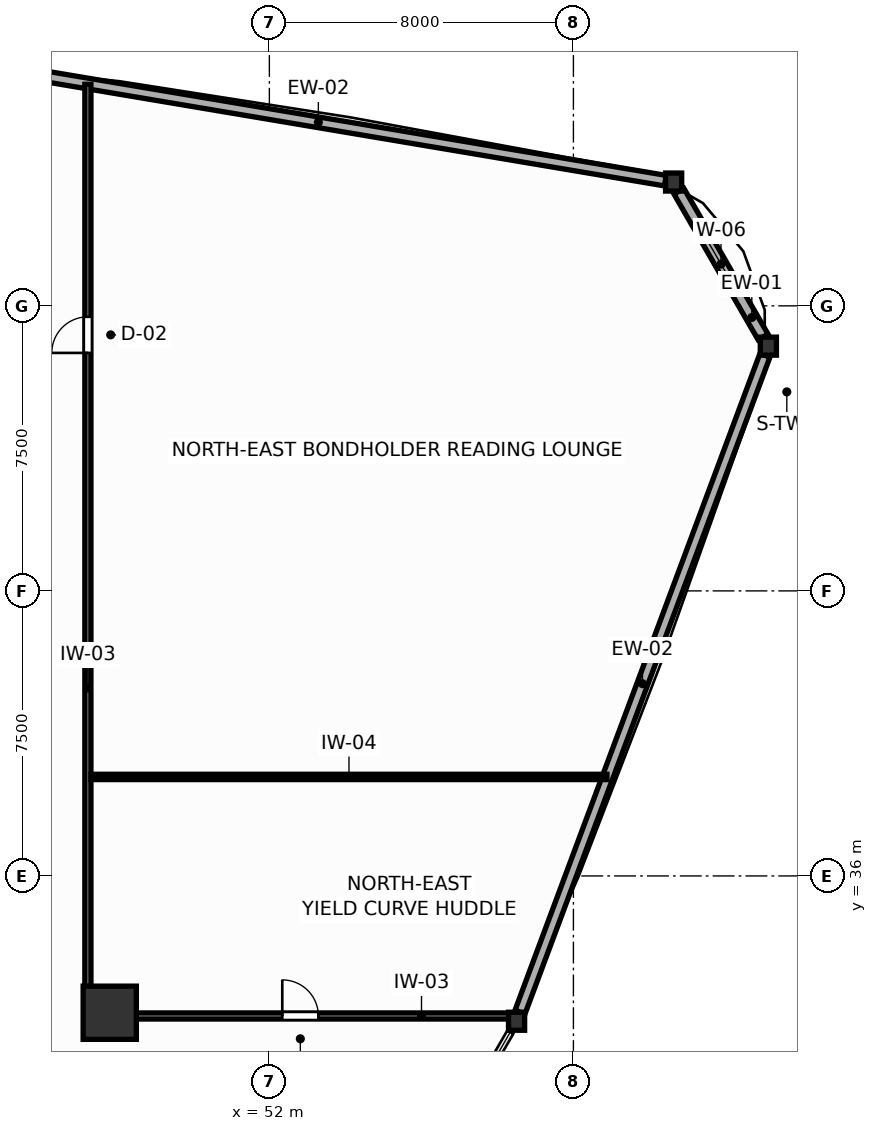
"""IFC4 building model, lengths in metres.
Left out: names, types, materials, properties, quantities, classifications, styles, units other than length and angle.
Written with IfcOpenShell. Run it as: python <this file> out.ifc"""

import sys

from ifc_helpers import new_model, si_unit, direction, frame, frame_2d, origin, origin_2d, place, context, subcontext, project, spatial, rectangle, i_section, extrude, source, transform, mapped, element, fill, save


model = new_model("IFC4")
c1 = context("Model", 3, precision=1e-05, world=origin(), true_north=direction((0.0, 1.0)))
c2 = subcontext(c1, "Body", "Model", "MODEL_VIEW")
j1 = project(units=[si_unit("LENGTHUNIT", "METRE"), si_unit("PLANEANGLEUNIT", "RADIAN")], contexts=[c1])
p1 = place(None, origin())
s1 = spatial("IfcSite", under=j1, at=p1, CompositionType="ELEMENT")
p2 = place(p1, origin())
s2 = spatial("IfcBuilding", under=s1, at=p2, CompositionType="ELEMENT")
p3 = place(p2, frame((0.0, 0.0, 43.5)))
s3 = spatial("IfcBuildingStorey", under=s2, at=p3, CompositionType="ELEMENT", Elevation=43.5)
m1 = source(origin(), c2, "Body", "SweptSolid", [
    extrude(rectangle(XDim=1.4, YDim=1.4, at=origin_2d()), origin(), (0.0, 0.0, 1.0), 3.9),
])
p4 = place(p3, frame((47.8, 32.4, 0.0), z_axis=(0.0, 0.0, 1.0), x_axis=(1.0, 0.0, 0.0)))
e1 = element("IfcColumn", 1, at=p4, inside=s3, PredefinedType="COLUMN", context=c2, shape_type="MappedRepresentation", body=[
    mapped(m1, transform((0.0, 0.0, 0.0), scale=1.0)),
])
m2 = source(origin(), c2, "Body", "SweptSolid", [
    extrude(i_section(OverallWidth=0.424, OverallDepth=0.474, WebThickness=0.045, FlangeThickness=0.072, FilletRadius=0.015, at=origin_2d()), origin(), (0.0, 0.0, 1.0), 3.9),
])
for number, where, z_axis, x_axis in (
    (2, (65.13, 49.94, 0.0), (0.0, 0.0, 1.0), (1.0, 0.0, 0.0)),
    (3, (62.637, 54.257, 0.0), (0.0, 0.0, 1.0), (1.0, 0.0, 0.0)),
    (4, (58.505, 32.177, 0.0), (0.0, 0.0, 1.0), (1.0, 0.0, 0.0)),
):
    element("IfcColumn", number, at=place(p3, frame(where, z_axis=z_axis, x_axis=x_axis)), inside=s3, PredefinedType="COLUMN", context=c2, shape_type="MappedRepresentation", body=[
        mapped(m2, transform((0.0, 0.0, 0.0), scale=1.0)),
    ])
p5 = place(p3, frame((64.99, 50.182, 0.0), z_axis=(0.0, 0.0, 1.0), x_axis=(-0.499994569991, 0.866028538779, 0.0)))
e5 = element("IfcWall", 5, at=p5, inside=s3, PredefinedType="SOLIDWALL", context=c2, shape_type="SweptSolid", body=[
    extrude(rectangle(XDim=4.427, YDim=0.3, at=frame_2d((2.213, 0.0))), origin(), (0.0, 0.0, 1.0), 2.08),
])
p6 = place(p5, frame((1.363, 0.0, 0.75)))
e6 = element("IfcOpeningElement", 6, at=p6, cuts=e5, PredefinedType="OPENING", context=c2, shape_type="SweptSolid", body=[
    extrude(rectangle(XDim=1.7, YDim=1.15, at=frame_2d((0.85, 0.575))), frame((0.0, 0.16, 0.0), z_axis=(0.0, -1.0, 0.0), x_axis=(1.0, 0.0, 0.0)), (0.0, 0.0, 1.0), 0.32),
])
p7 = place(p3, frame((62.42, 54.294, 0.0), z_axis=(0.0, 0.0, 1.0), x_axis=(-0.986153073874, 0.165837616025, 0.0)))
e7 = element("IfcWall", 7, at=p7, inside=s3, PredefinedType="SOLIDWALL", context=c2, shape_type="SweptSolid", body=[
    extrude(rectangle(XDim=18.518, YDim=0.28, at=frame_2d((9.259, 0.0))), origin(), (0.0, 0.0, 1.0), 2.08),
])
p8 = place(p3, frame((58.595, 32.418, 0.0), z_axis=(0.0, 0.0, 1.0), x_axis=(0.349439969545, 0.936958754527, 0.0)))
e8 = element("IfcWall", 8, at=p8, inside=s3, PredefinedType="SOLIDWALL", context=c2, shape_type="SweptSolid", body=[
    extrude(rectangle(XDim=18.442, YDim=0.28, at=frame_2d((9.221, 0.0))), origin(), (0.0, 0.0, 1.0), 2.08),
])
p9 = place(p3, frame((47.225, 32.31, 0.0), z_axis=(0.0, 0.0, 1.0), x_axis=(0.0, 1.0, 0.0)))
e9 = element("IfcWall", 9, at=p9, inside=s3, PredefinedType="PARTITIONING", context=c2, shape_type="SweptSolid", body=[
    extrude(rectangle(XDim=24.519, YDim=0.16, at=frame_2d((12.26, 0.0))), origin(), (0.0, 0.0, 1.0), 3.68),
])
p10 = place(p9, frame((17.451, 0.0, 0.0)))
e10 = element("IfcOpeningElement", 10, at=p10, cuts=e9, PredefinedType="OPENING", context=c2, shape_type="SweptSolid", body=[
    extrude(rectangle(XDim=0.95, YDim=2.05, at=frame_2d((0.475, 1.025))), frame((0.0, 0.09, 0.0), z_axis=(0.0, -1.0, 0.0), x_axis=(1.0, 0.0, 0.0)), (0.0, 0.0, 1.0), 0.18),
])
p11 = place(p3, frame((47.307, 32.315, 0.0), z_axis=(0.0, 0.0, 1.0), x_axis=(1.0, 0.0, 0.0)))
e11 = element("IfcWall", 11, at=p11, inside=s3, PredefinedType="PARTITIONING", context=c2, shape_type="SweptSolid", body=[
    extrude(rectangle(XDim=11.23, YDim=0.16, at=frame_2d((5.615, 0.0))), origin(), (0.0, 0.0, 1.0), 2.24),
])
p12 = place(p11, frame((5.033, 0.0, 0.0)))
e12 = element("IfcOpeningElement", 12, at=p12, cuts=e11, PredefinedType="OPENING", context=c2, shape_type="SweptSolid", body=[
    extrude(rectangle(XDim=0.95, YDim=2.05, at=frame_2d((0.475, 1.025))), frame((0.0, 0.09, 0.0), z_axis=(0.0, -1.0, 0.0), x_axis=(1.0, 0.0, 0.0)), (0.0, 0.0, 1.0), 0.18),
])
p13 = place(p3, frame((47.307, 38.605, 0.0), z_axis=(0.0, 0.0, 1.0), x_axis=(1.0, 0.0, 0.0)))
e13 = element("IfcWall", 13, at=p13, inside=s3, PredefinedType="PARTITIONING", context=c2, shape_type="SweptSolid", body=[
    extrude(rectangle(XDim=13.575, YDim=0.14, at=frame_2d((6.788, 0.0))), origin(), (0.0, 0.0, 1.0), 3.68),
])
p14 = place(p6, origin())
e14 = element("IfcWindow", 14, at=p14, inside=s3, PartitioningType="SINGLE_PANEL", PredefinedType="WINDOW", context=c2, shape_type="SweptSolid", body=[
    extrude(rectangle(XDim=1.7, YDim=1.15, at=frame_2d((0.85, 0.575))), frame((0.0, 0.03, 0.0), z_axis=(0.0, -1.0, 0.0), x_axis=(1.0, 0.0, 0.0)), (0.0, 0.0, 1.0), 0.06),
])
fill(e6, e14)
p15 = place(p10, origin())
e15 = element("IfcDoor", 15, at=p15, inside=s3, OperationType="SINGLE_SWING_LEFT", PredefinedType="DOOR", context=c2, shape_type="SweptSolid", body=[
    extrude(rectangle(XDim=0.95, YDim=2.05, at=frame_2d((0.475, 1.025))), frame((0.0, 0.025, 0.0), z_axis=(0.0, -1.0, 0.0), x_axis=(1.0, 0.0, 0.0)), (0.0, 0.0, 1.0), 0.05),
])
fill(e10, e15)
p16 = place(p12, origin())
e16 = element("IfcDoor", 16, at=p16, inside=s3, OperationType="SINGLE_SWING_LEFT", PredefinedType="DOOR", context=c2, shape_type="SweptSolid", body=[
    extrude(rectangle(XDim=0.95, YDim=2.05, at=frame_2d((0.475, 1.025))), frame((0.0, 0.025, 0.0), z_axis=(0.0, -1.0, 0.0), x_axis=(1.0, 0.0, 0.0)), (0.0, 0.0, 1.0), 0.05),
])
fill(e12, e16)
save(model, sys.argv[1])
